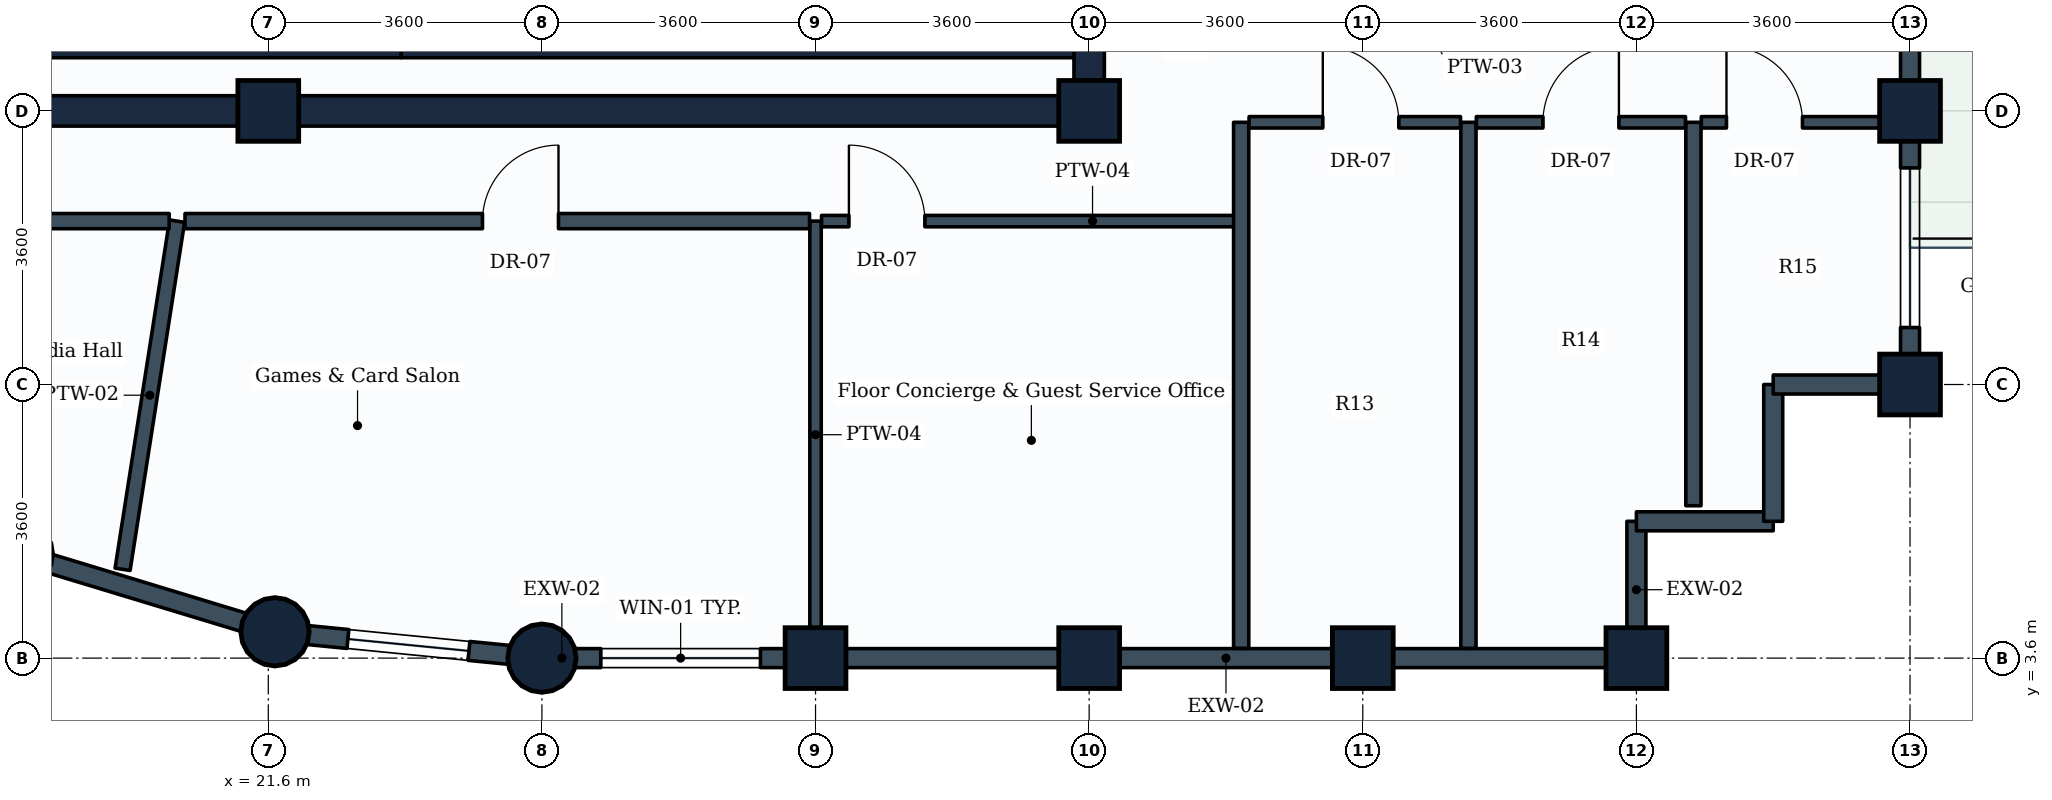
"""IFC4 building model, lengths in metres.
Left out: names, types, materials, properties, quantities, classifications, styles, units other than length and angle.
Written with IfcOpenShell. Run it as: python <this file> out.ifc"""

import sys

from ifc_helpers import new_model, si_unit, direction, frame, frame_2d, origin, origin_2d, place, context, subcontext, project, spatial, rectangle, circle, extrude, element, fill, save


model = new_model("IFC4")
c1 = context("Model", 3, precision=1e-05, world=origin(), true_north=direction((0.0, 1.0)))
c2 = subcontext(c1, "Body", "Model", "MODEL_VIEW")
j1 = project(units=[si_unit("LENGTHUNIT", "METRE"), si_unit("PLANEANGLEUNIT", "RADIAN")], contexts=[c1])
p1 = place(None, origin())
s1 = spatial("IfcSite", under=j1, at=p1, CompositionType="ELEMENT")
p2 = place(p1, origin())
s2 = spatial("IfcBuilding", under=s1, at=p2, CompositionType="ELEMENT")
p3 = place(p2, frame((0.0, 0.0, 224.6)))
s3 = spatial("IfcBuildingStorey", under=s2, at=p3, CompositionType="ELEMENT", Elevation=224.6)
p4 = place(p3, frame((18.312, 4.97, 0.0), z_axis=(0.0, 0.0, 1.0), x_axis=(1.0, 0.0, 0.0)))
e1 = element("IfcColumn", 1, at=p4, inside=s3, PredefinedType="COLUMN", context=c2, shape_type="SweptSolid", body=[
    extrude(circle(Radius=0.45, at=origin_2d()), origin(), (0.0, 0.0, 1.0), 3.6),
])
p5 = place(p3, frame((21.6, 10.8, 0.0), z_axis=(0.0, 0.0, 1.0), x_axis=(1.0, 0.0, 0.0)))
e2 = element("IfcColumn", 2, at=p5, inside=s3, PredefinedType="COLUMN", context=c2, shape_type="SweptSolid", body=[
    extrude(rectangle(XDim=0.8, YDim=0.8, at=origin_2d()), origin(), (0.0, 0.0, 1.0), 3.6),
])
for number, where, z_axis, x_axis in (
    (3, (21.688, 3.946, 0.0), (0.0, 0.0, 1.0), (1.0, 0.0, 0.0)),
    (4, (25.2, 3.6, 0.0), (0.0, 0.0, 1.0), (1.0, 0.0, 0.0)),
):
    element("IfcColumn", number, at=place(p3, frame(where, z_axis=z_axis, x_axis=x_axis)), inside=s3, PredefinedType="COLUMN", context=c2, shape_type="SweptSolid", body=[
        extrude(circle(Radius=0.45, at=origin_2d()), origin(), (0.0, 0.0, 1.0), 3.6),
    ])
for number, where, z_axis, x_axis in (
    (5, (28.8, 3.6, 0.0), (0.0, 0.0, 1.0), (1.0, 0.0, 0.0)),
    (6, (32.4, 3.6, 0.0), (0.0, 0.0, 1.0), (1.0, 0.0, 0.0)),
    (7, (32.4, 10.8, 0.0), (0.0, 0.0, 1.0), (1.0, 0.0, 0.0)),
    (8, (36.0, 3.6, 0.0), (0.0, 0.0, 1.0), (1.0, 0.0, 0.0)),
    (9, (39.6, 3.6, 0.0), (0.0, 0.0, 1.0), (1.0, 0.0, 0.0)),
    (10, (43.2, 7.2, 0.0), (0.0, 0.0, 1.0), (1.0, 0.0, 0.0)),
    (11, (43.2, 10.8, 0.0), (0.0, 0.0, 1.0), (0.0, 1.0, 0.0)),
):
    element("IfcColumn", number, at=place(p3, frame(where, z_axis=z_axis, x_axis=x_axis)), inside=s3, PredefinedType="COLUMN", context=c2, shape_type="SweptSolid", body=[
        extrude(rectangle(XDim=0.8, YDim=0.8, at=origin_2d()), origin(), (0.0, 0.0, 1.0), 3.6),
    ])
p6 = place(p3, frame((28.8, 3.6, 0.0), z_axis=(0.0, 0.0, 1.0), x_axis=(-1.0, 0.0, 0.0)))
e12 = element("IfcWall", 12, at=p6, inside=s3, PredefinedType="STANDARD", context=c2, shape_type="SweptSolid", body=[
    extrude(rectangle(XDim=3.6, YDim=0.25, at=frame_2d((1.8, 0.0))), origin(), (0.0, 0.0, 1.0), 2.83),
])
p7 = place(p6, frame((0.725, 0.0, 0.85)))
e13 = element("IfcOpeningElement", 13, at=p7, cuts=e12, PredefinedType="OPENING", context=c2, shape_type="SweptSolid", body=[
    extrude(rectangle(XDim=2.1, YDim=1.35, at=frame_2d((1.05, 0.675))), frame((0.0, 0.135, 0.0), z_axis=(0.0, -1.0, 0.0), x_axis=(1.0, 0.0, 0.0)), (0.0, 0.0, 1.0), 0.27),
])
p8 = place(p3, frame((32.4, 3.6, 0.0), z_axis=(0.0, 0.0, 1.0), x_axis=(-1.0, 0.0, 0.0)))
e14 = element("IfcWall", 14, at=p8, inside=s3, PredefinedType="STANDARD", context=c2, shape_type="SweptSolid", body=[
    extrude(rectangle(XDim=3.6, YDim=0.25, at=frame_2d((1.8, 0.0))), origin(), (0.0, 0.0, 1.0), 2.83),
])
for number, where, z_axis, x_axis in (
    (15, (36.0, 3.6, 0.0), (0.0, 0.0, 1.0), (-1.0, 0.0, 0.0)),
    (16, (39.6, 3.6, 0.0), (0.0, 0.0, 1.0), (-1.0, 0.0, 0.0)),
):
    element("IfcWall", number, at=place(p3, frame(where, z_axis=z_axis, x_axis=x_axis)), inside=s3, PredefinedType="STANDARD", context=c2, shape_type="SweptSolid", body=[
        extrude(rectangle(XDim=3.6, YDim=0.25, at=frame_2d((1.8, 0.0))), origin(), (0.0, 0.0, 1.0), 2.83),
    ])
p9 = place(p3, frame((39.6, 5.4, 0.0), z_axis=(0.0, 0.0, 1.0), x_axis=(0.0, -1.0, 0.0)))
e17 = element("IfcWall", 17, at=p9, inside=s3, PredefinedType="STANDARD", context=c2, shape_type="SweptSolid", body=[
    extrude(rectangle(XDim=1.8, YDim=0.25, at=frame_2d((0.9, 0.0))), origin(), (0.0, 0.0, 1.0), 2.83),
])
p10 = place(p3, frame((41.4, 5.4, 0.0), z_axis=(0.0, 0.0, 1.0), x_axis=(-1.0, 0.0, 0.0)))
e18 = element("IfcWall", 18, at=p10, inside=s3, PredefinedType="STANDARD", context=c2, shape_type="SweptSolid", body=[
    extrude(rectangle(XDim=1.8, YDim=0.25, at=frame_2d((0.9, 0.0))), origin(), (0.0, 0.0, 1.0), 3.335),
])
p11 = place(p3, frame((41.4, 7.2, 0.0), z_axis=(0.0, 0.0, 1.0), x_axis=(0.0, -1.0, 0.0)))
e19 = element("IfcWall", 19, at=p11, inside=s3, PredefinedType="STANDARD", context=c2, shape_type="SweptSolid", body=[
    extrude(rectangle(XDim=1.8, YDim=0.25, at=frame_2d((0.9, 0.0))), origin(), (0.0, 0.0, 1.0), 3.335),
])
p12 = place(p3, frame((43.2, 7.2, 0.0), z_axis=(0.0, 0.0, 1.0), x_axis=(-1.0, 0.0, 0.0)))
e20 = element("IfcWall", 20, at=p12, inside=s3, PredefinedType="STANDARD", context=c2, shape_type="SweptSolid", body=[
    extrude(rectangle(XDim=1.8, YDim=0.25, at=frame_2d((0.9, 0.0))), origin(), (0.0, 0.0, 1.0), 2.83),
])
p13 = place(p3, frame((43.2, 10.8, 0.0), z_axis=(0.0, 0.0, 1.0), x_axis=(0.0, -1.0, 0.0)))
e21 = element("IfcWall", 21, at=p13, inside=s3, PredefinedType="STANDARD", context=c2, shape_type="SweptSolid", body=[
    extrude(rectangle(XDim=3.6, YDim=0.25, at=frame_2d((1.8, 0.0))), origin(), (0.0, 0.0, 1.0), 2.83),
])
p14 = place(p13, frame((0.75, 0.0, 0.85)))
e22 = element("IfcOpeningElement", 22, at=p14, cuts=e21, PredefinedType="OPENING", context=c2, shape_type="SweptSolid", body=[
    extrude(rectangle(XDim=2.1, YDim=1.35, at=frame_2d((1.05, 0.675))), frame((0.0, 0.135, 0.0), z_axis=(0.0, -1.0, 0.0), x_axis=(1.0, 0.0, 0.0)), (0.0, 0.0, 1.0), 0.27),
])
p15 = place(p3, frame((43.2, 14.4, 0.0), z_axis=(0.0, 0.0, 1.0), x_axis=(0.0, -1.0, 0.0)))
e23 = element("IfcWall", 23, at=p15, inside=s3, PredefinedType="STANDARD", context=c2, shape_type="SweptSolid", body=[
    extrude(rectangle(XDim=3.6, YDim=0.25, at=frame_2d((1.8, 0.0))), origin(), (0.0, 0.0, 1.0), 2.83),
])
p16 = place(p15, frame((0.491, 0.0, 0.0)))
e24 = element("IfcOpeningElement", 24, at=p16, cuts=e23, PredefinedType="OPENING", context=c2, shape_type="SweptSolid", body=[
    extrude(rectangle(XDim=1.0, YDim=2.1, at=frame_2d((0.5, 1.05))), frame((0.0, 0.135, 0.0), z_axis=(0.0, -1.0, 0.0), x_axis=(1.0, 0.0, 0.0)), (0.0, 0.0, 1.0), 0.27),
])
p17 = place(p3, frame((21.688, 3.946, 0.0), z_axis=(0.0, 0.0, 1.0), x_axis=(-0.956953367403, 0.290241714123, 0.0)))
e25 = element("IfcWall", 25, at=p17, inside=s3, PredefinedType="STANDARD", context=c2, shape_type="SweptSolid", body=[
    extrude(rectangle(XDim=3.528, YDim=0.25, at=frame_2d((1.764, 0.0))), origin(), (0.0, 0.0, 1.0), 2.83),
])
p18 = place(p3, frame((25.2, 3.6, 0.0), z_axis=(0.0, 0.0, 1.0), x_axis=(-0.995183369056, 0.098030923459, 0.0)))
e26 = element("IfcWall", 26, at=p18, inside=s3, PredefinedType="STANDARD", context=c2, shape_type="SweptSolid", body=[
    extrude(rectangle(XDim=3.529, YDim=0.25, at=frame_2d((1.765, 0.0))), origin(), (0.0, 0.0, 1.0), 2.83),
])
p19 = place(p18, frame((0.965, 0.0, 0.85)))
e27 = element("IfcOpeningElement", 27, at=p19, cuts=e26, PredefinedType="OPENING", context=c2, shape_type="SweptSolid", body=[
    extrude(rectangle(XDim=1.6, YDim=1.35, at=frame_2d((0.8, 0.675))), frame((0.0, 0.135, 0.0), z_axis=(0.0, -1.0, 0.0), x_axis=(1.0, 0.0, 0.0)), (0.0, 0.0, 1.0), 0.27),
])
p20 = place(p3, frame((14.4, 10.8, 0.0), z_axis=(0.0, 0.0, 1.0), x_axis=(1.0, 0.0, 0.0)))
e28 = element("IfcWall", 28, at=p20, inside=s3, PredefinedType="SHEAR", context=c2, shape_type="SweptSolid", body=[
    extrude(rectangle(XDim=18.0, YDim=0.4, at=frame_2d((9.0, 0.0))), origin(), (0.0, 0.0, 1.0), 3.35),
])
p21 = place(p3, frame((32.4, 10.8, 0.0), z_axis=(0.0, 0.0, 1.0), x_axis=(0.0, 1.0, 0.0)))
e29 = element("IfcWall", 29, at=p21, inside=s3, PredefinedType="SHEAR", context=c2, shape_type="SweptSolid", body=[
    extrude(rectangle(XDim=14.4, YDim=0.4, at=frame_2d((7.2, 0.0))), origin(), (0.0, 0.0, 1.0), 3.35),
])
p22 = place(p21, frame((4.35, 0.0, 0.0)))
e30 = element("IfcOpeningElement", 30, at=p22, cuts=e29, PredefinedType="OPENING", context=c2, shape_type="SweptSolid", body=[
    extrude(rectangle(XDim=1.2, YDim=2.1, at=frame_2d((0.6, 1.05))), frame((0.0, 0.21, 0.0), z_axis=(0.0, -1.0, 0.0), x_axis=(1.0, 0.0, 0.0)), (0.0, 0.0, 1.0), 0.42),
])
p23 = place(p21, frame((10.0, 0.0, 0.0)))
e31 = element("IfcOpeningElement", 31, at=p23, cuts=e29, PredefinedType="OPENING", context=c2, shape_type="SweptSolid", body=[
    extrude(rectangle(XDim=1.2, YDim=2.1, at=frame_2d((0.6, 1.05))), frame((0.0, 0.21, 0.0), z_axis=(0.0, -1.0, 0.0), x_axis=(1.0, 0.0, 0.0)), (0.0, 0.0, 1.0), 0.42),
])
p24 = place(p3, frame((14.6, 11.625, 0.0), z_axis=(0.0, 0.0, 1.0), x_axis=(1.0, 0.0, 0.0)))
e32 = element("IfcWall", 32, at=p24, inside=s3, PredefinedType="SHEAR", context=c2, shape_type="SweptSolid", body=[
    extrude(rectangle(XDim=8.75, YDim=0.25, at=frame_2d((4.375, 0.0))), origin(), (0.0, 0.0, 1.0), 3.35),
])
p25 = place(p3, frame((23.35, 11.625, 0.0), z_axis=(0.0, 0.0, 1.0), x_axis=(1.0, 0.0, 0.0)))
e33 = element("IfcWall", 33, at=p25, inside=s3, PredefinedType="SHEAR", context=c2, shape_type="SweptSolid", body=[
    extrude(rectangle(XDim=8.85, YDim=0.25, at=frame_2d((4.425, 0.0))), origin(), (0.0, 0.0, 1.0), 3.35),
])
p26 = place(p3, frame((28.8, 9.35, 0.0), z_axis=(0.0, 0.0, 1.0), x_axis=(0.0, -1.0, 0.0)))
e34 = element("IfcWall", 34, at=p26, inside=s3, PredefinedType="PARTITIONING", context=c2, shape_type="SweptSolid", body=[
    extrude(rectangle(XDim=5.621, YDim=0.15, at=frame_2d((2.811, 0.0))), origin(), (0.0, 0.0, 1.0), 3.335),
])
p27 = place(p3, frame((20.4, 9.35, 0.0), z_axis=(0.0, 0.0, 1.0), x_axis=(-0.154564772307, -0.987982657318, 0.0)))
e35 = element("IfcWall", 35, at=p27, inside=s3, PredefinedType="PARTITIONING", context=c2, shape_type="SweptSolid", body=[
    extrude(rectangle(XDim=4.637, YDim=0.2, at=frame_2d((2.319, 0.0))), origin(), (0.0, 0.0, 1.0), 2.83),
])
p28 = place(p3, frame((12.95, 9.35, 0.0), z_axis=(0.0, 0.0, 1.0), x_axis=(1.0, 0.0, 0.0)))
e36 = element("IfcWall", 36, at=p28, inside=s3, PredefinedType="PARTITIONING", context=c2, shape_type="SweptSolid", body=[
    extrude(rectangle(XDim=7.346, YDim=0.2, at=frame_2d((3.673, 0.0))), origin(), (0.0, 0.0, 1.0), 3.02),
])
p29 = place(p28, frame((4.261, 0.0, 0.0)))
e37 = element("IfcOpeningElement", 37, at=p29, cuts=e36, PredefinedType="OPENING", context=c2, shape_type="SweptSolid", body=[
    extrude(rectangle(XDim=1.0, YDim=2.1, at=frame_2d((0.5, 1.05))), frame((0.0, 0.11, 0.0), z_axis=(0.0, -1.0, 0.0), x_axis=(1.0, 0.0, 0.0)), (0.0, 0.0, 1.0), 0.22),
])
p30 = place(p3, frame((20.504, 9.35, 0.0), z_axis=(0.0, 0.0, 1.0), x_axis=(1.0, 0.0, 0.0)))
e38 = element("IfcWall", 38, at=p30, inside=s3, PredefinedType="PARTITIONING", context=c2, shape_type="SweptSolid", body=[
    extrude(rectangle(XDim=8.217, YDim=0.2, at=frame_2d((4.108, 0.0))), origin(), (0.0, 0.0, 1.0), 3.02),
])
p31 = place(p30, frame((3.914, 0.0, 0.0)))
e39 = element("IfcOpeningElement", 39, at=p31, cuts=e38, PredefinedType="OPENING", context=c2, shape_type="SweptSolid", body=[
    extrude(rectangle(XDim=1.0, YDim=2.1, at=frame_2d((0.5, 1.05))), frame((0.0, 0.11, 0.0), z_axis=(0.0, -1.0, 0.0), x_axis=(1.0, 0.0, 0.0)), (0.0, 0.0, 1.0), 0.22),
])
p32 = place(p3, frame((28.879, 9.35, 0.0), z_axis=(0.0, 0.0, 1.0), x_axis=(1.0, 0.0, 0.0)))
e40 = element("IfcWall", 40, at=p32, inside=s3, PredefinedType="PARTITIONING", context=c2, shape_type="SweptSolid", body=[
    extrude(rectangle(XDim=5.521, YDim=0.15, at=frame_2d((2.76, 0.0))), origin(), (0.0, 0.0, 1.0), 3.335),
])
p33 = place(p32, frame((0.36, 0.0, 0.0)))
e41 = element("IfcOpeningElement", 41, at=p33, cuts=e40, PredefinedType="OPENING", context=c2, shape_type="SweptSolid", body=[
    extrude(rectangle(XDim=1.0, YDim=2.1, at=frame_2d((0.5, 1.05))), frame((0.0, 0.085, 0.0), z_axis=(0.0, -1.0, 0.0), x_axis=(1.0, 0.0, 0.0)), (0.0, 0.0, 1.0), 0.17),
])
for number, where, z_axis, x_axis in (
    (42, (34.4, 3.729, 0.0), (0.0, 0.0, 1.0), (0.0, 1.0, 0.0)),
    (43, (37.39, 3.729, 0.0), (0.0, 0.0, 1.0), (0.0, 1.0, 0.0)),
):
    element("IfcWall", number, at=place(p3, frame(where, z_axis=z_axis, x_axis=x_axis)), inside=s3, PredefinedType="PARTITIONING", context=c2, shape_type="SweptSolid", body=[
        extrude(rectangle(XDim=6.921, YDim=0.2, at=frame_2d((3.46, 0.0))), origin(), (0.0, 0.0, 1.0), 2.83),
    ])
p34 = place(p3, frame((34.504, 10.65, 0.0), z_axis=(0.0, 0.0, 1.0), x_axis=(1.0, 0.0, 0.0)))
e44 = element("IfcWall", 44, at=p34, inside=s3, PredefinedType="PARTITIONING", context=c2, shape_type="SweptSolid", body=[
    extrude(rectangle(XDim=2.782, YDim=0.15, at=frame_2d((1.391, 0.0))), origin(), (0.0, 0.0, 1.0), 3.02),
])
p35 = place(p34, frame((0.97, 0.0, 0.0)))
e45 = element("IfcOpeningElement", 45, at=p35, cuts=e44, PredefinedType="OPENING", context=c2, shape_type="SweptSolid", body=[
    extrude(rectangle(XDim=1.0, YDim=2.1, at=frame_2d((0.5, 1.05))), frame((0.0, 0.085, 0.0), z_axis=(0.0, -1.0, 0.0), x_axis=(1.0, 0.0, 0.0)), (0.0, 0.0, 1.0), 0.17),
])
p36 = place(p3, frame((40.35, 5.605, 0.0), z_axis=(0.0, 0.0, 1.0), x_axis=(0.0, 1.0, 0.0)))
e46 = element("IfcWall", 46, at=p36, inside=s3, PredefinedType="PARTITIONING", context=c2, shape_type="SweptSolid", body=[
    extrude(rectangle(XDim=5.045, YDim=0.2, at=frame_2d((2.522, 0.0))), origin(), (0.0, 0.0, 1.0), 3.335),
])
p37 = place(p3, frame((37.494, 10.65, 0.0), z_axis=(0.0, 0.0, 1.0), x_axis=(1.0, 0.0, 0.0)))
e47 = element("IfcWall", 47, at=p37, inside=s3, PredefinedType="PARTITIONING", context=c2, shape_type="SweptSolid", body=[
    extrude(rectangle(XDim=2.752, YDim=0.15, at=frame_2d((1.376, 0.0))), origin(), (0.0, 0.0, 1.0), 3.335),
])
p38 = place(p37, frame((0.876, 0.0, 0.0)))
e48 = element("IfcOpeningElement", 48, at=p38, cuts=e47, PredefinedType="OPENING", context=c2, shape_type="SweptSolid", body=[
    extrude(rectangle(XDim=1.0, YDim=2.1, at=frame_2d((0.5, 1.05))), frame((0.0, 0.085, 0.0), z_axis=(0.0, -1.0, 0.0), x_axis=(1.0, 0.0, 0.0)), (0.0, 0.0, 1.0), 0.17),
])
p39 = place(p3, frame((40.454, 10.65, 0.0), z_axis=(0.0, 0.0, 1.0), x_axis=(1.0, 0.0, 0.0)))
e49 = element("IfcWall", 49, at=p39, inside=s3, PredefinedType="PARTITIONING", context=c2, shape_type="SweptSolid", body=[
    extrude(rectangle(XDim=2.617, YDim=0.15, at=frame_2d((1.309, 0.0))), origin(), (0.0, 0.0, 1.0), 2.83),
])
p40 = place(p39, frame((0.331, 0.0, 0.0)))
e50 = element("IfcOpeningElement", 50, at=p40, cuts=e49, PredefinedType="OPENING", context=c2, shape_type="SweptSolid", body=[
    extrude(rectangle(XDim=1.0, YDim=2.1, at=frame_2d((0.5, 1.05))), frame((0.0, 0.085, 0.0), z_axis=(0.0, -1.0, 0.0), x_axis=(1.0, 0.0, 0.0)), (0.0, 0.0, 1.0), 0.17),
])
p41 = place(p7, origin())
e51 = element("IfcWindow", 51, at=p41, inside=s3, PartitioningType="SINGLE_PANEL", PredefinedType="WINDOW", context=c2, shape_type="SweptSolid", body=[
    extrude(rectangle(XDim=2.1, YDim=1.35, at=frame_2d((1.05, 0.675))), frame((0.0, 0.03, 0.0), z_axis=(0.0, -1.0, 0.0), x_axis=(1.0, 0.0, 0.0)), (0.0, 0.0, 1.0), 0.06),
])
fill(e13, e51)
p42 = place(p14, origin())
e52 = element("IfcWindow", 52, at=p42, inside=s3, PartitioningType="SINGLE_PANEL", PredefinedType="WINDOW", context=c2, shape_type="SweptSolid", body=[
    extrude(rectangle(XDim=2.1, YDim=1.35, at=frame_2d((1.05, 0.675))), frame((0.0, 0.03, 0.0), z_axis=(0.0, -1.0, 0.0), x_axis=(1.0, 0.0, 0.0)), (0.0, 0.0, 1.0), 0.06),
])
fill(e22, e52)
p43 = place(p19, origin())
e53 = element("IfcWindow", 53, at=p43, inside=s3, PartitioningType="SINGLE_PANEL", PredefinedType="WINDOW", context=c2, shape_type="SweptSolid", body=[
    extrude(rectangle(XDim=1.6, YDim=1.35, at=frame_2d((0.8, 0.675))), frame((0.0, 0.03, 0.0), z_axis=(0.0, -1.0, 0.0), x_axis=(1.0, 0.0, 0.0)), (0.0, 0.0, 1.0), 0.06),
])
fill(e27, e53)
p44 = place(p31, origin())
e54 = element("IfcDoor", 54, at=p44, inside=s3, OperationType="SINGLE_SWING_RIGHT", PredefinedType="DOOR", context=c2, shape_type="SweptSolid", body=[
    extrude(rectangle(XDim=1.0, YDim=2.1, at=frame_2d((0.5, 1.05))), frame((0.0, 0.025, 0.0), z_axis=(0.0, -1.0, 0.0), x_axis=(1.0, 0.0, 0.0)), (0.0, 0.0, 1.0), 0.05),
])
fill(e39, e54)
p45 = place(p33, origin())
e55 = element("IfcDoor", 55, at=p45, inside=s3, OperationType="SINGLE_SWING_LEFT", PredefinedType="DOOR", context=c2, shape_type="SweptSolid", body=[
    extrude(rectangle(XDim=1.0, YDim=2.1, at=frame_2d((0.5, 1.05))), frame((0.0, 0.025, 0.0), z_axis=(0.0, -1.0, 0.0), x_axis=(1.0, 0.0, 0.0)), (0.0, 0.0, 1.0), 0.05),
])
fill(e41, e55)
p46 = place(p35, origin())
e56 = element("IfcDoor", 56, at=p46, inside=s3, OperationType="SINGLE_SWING_LEFT", PredefinedType="DOOR", context=c2, shape_type="SweptSolid", body=[
    extrude(rectangle(XDim=1.0, YDim=2.1, at=frame_2d((0.5, 1.05))), frame((0.0, 0.025, 0.0), z_axis=(0.0, -1.0, 0.0), x_axis=(1.0, 0.0, 0.0)), (0.0, 0.0, 1.0), 0.05),
])
fill(e45, e56)
p47 = place(p38, origin())
e57 = element("IfcDoor", 57, at=p47, inside=s3, OperationType="SINGLE_SWING_RIGHT", PredefinedType="DOOR", context=c2, shape_type="SweptSolid", body=[
    extrude(rectangle(XDim=1.0, YDim=2.1, at=frame_2d((0.5, 1.05))), frame((0.0, 0.025, 0.0), z_axis=(0.0, -1.0, 0.0), x_axis=(1.0, 0.0, 0.0)), (0.0, 0.0, 1.0), 0.05),
])
fill(e48, e57)
p48 = place(p40, origin())
e58 = element("IfcDoor", 58, at=p48, inside=s3, OperationType="SINGLE_SWING_LEFT", PredefinedType="DOOR", context=c2, shape_type="SweptSolid", body=[
    extrude(rectangle(XDim=1.0, YDim=2.1, at=frame_2d((0.5, 1.05))), frame((0.0, 0.025, 0.0), z_axis=(0.0, -1.0, 0.0), x_axis=(1.0, 0.0, 0.0)), (0.0, 0.0, 1.0), 0.05),
])
fill(e50, e58)
save(model, sys.argv[1])
